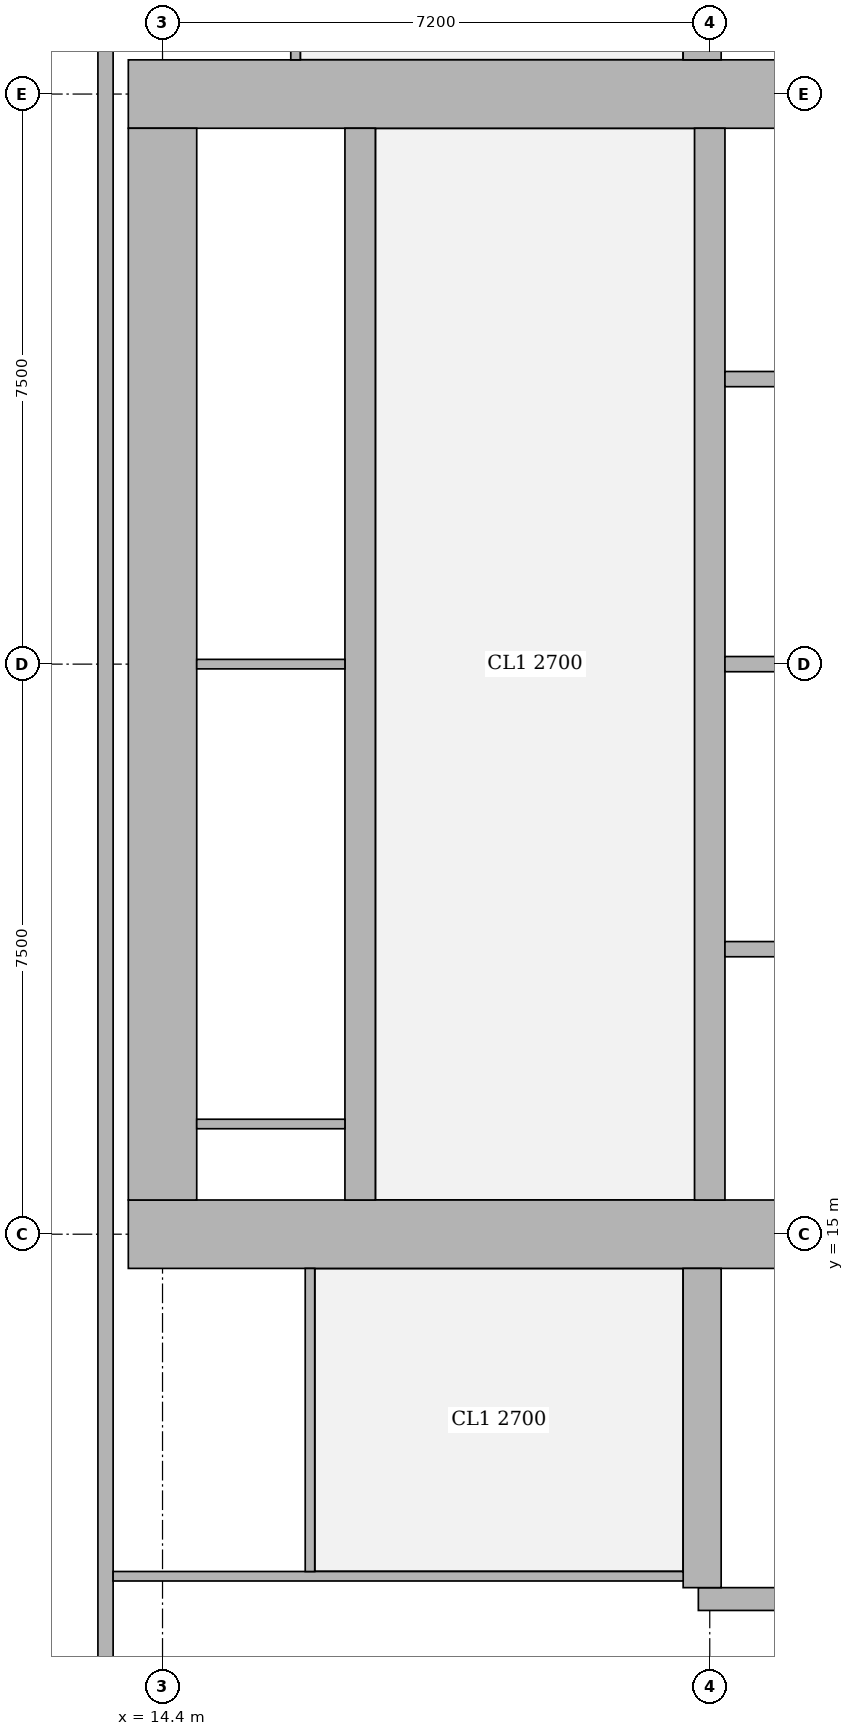
"""IFC4 building model, lengths in metres.
Left out: names, types, materials, properties, quantities, classifications, styles, units other than length and angle.
Written with IfcOpenShell. Run it as: python <this file> out.ifc"""

import sys

from ifc_helpers import new_model, si_unit, direction, frame, frame_2d, origin, place, context, subcontext, project, spatial, rectangle, extrude, element, fill, save


model = new_model("IFC4")
c1 = context("Model", 3, precision=1e-05, world=origin(), true_north=direction((0.0, 1.0)))
c2 = subcontext(c1, "Body", "Model", "MODEL_VIEW")
j1 = project(units=[si_unit("LENGTHUNIT", "METRE"), si_unit("PLANEANGLEUNIT", "RADIAN")], contexts=[c1])
p1 = place(None, origin())
s1 = spatial("IfcSite", under=j1, at=p1, CompositionType="ELEMENT")
p2 = place(p1, origin())
s2 = spatial("IfcBuilding", under=s1, at=p2, CompositionType="ELEMENT")
p3 = place(p2, frame((0.0, 0.0, 274.1)))
s3 = spatial("IfcBuildingStorey", under=s2, at=p3, CompositionType="ELEMENT", Elevation=274.1)
p4 = place(p3, frame((13.95, 15.0, 0.0), z_axis=(0.0, 0.0, 1.0), x_axis=(1.0, 0.0, 0.0)))
e1 = element("IfcWall", 1, at=p4, inside=s3, PredefinedType="SHEAR", context=c2, shape_type="SweptSolid", body=[
    extrude(rectangle(XDim=15.3, YDim=0.9, at=frame_2d((7.65, 0.0))), origin(), (0.0, 0.0, 1.0), 3.75),
])
p5 = place(p4, frame((4.45, 0.0, 0.0)))
e2 = element("IfcOpeningElement", 2, at=p5, cuts=e1, PredefinedType="OPENING", context=c2, shape_type="SweptSolid", body=[
    extrude(rectangle(XDim=1.8, YDim=2.1, at=frame_2d((0.9, 1.05))), frame((0.0, 0.46, 0.0), z_axis=(0.0, -1.0, 0.0), x_axis=(1.0, 0.0, 0.0)), (0.0, 0.0, 1.0), 0.92),
])
p6 = place(p4, frame((10.7, 0.0, 0.0)))
e3 = element("IfcOpeningElement", 3, at=p6, cuts=e1, PredefinedType="OPENING", context=c2, shape_type="SweptSolid", body=[
    extrude(rectangle(XDim=1.1, YDim=2.1, at=frame_2d((0.55, 1.05))), frame((0.0, 0.46, 0.0), z_axis=(0.0, -1.0, 0.0), x_axis=(1.0, 0.0, 0.0)), (0.0, 0.0, 1.0), 0.92),
])
p7 = place(p3, frame((13.95, 30.0, 0.0), z_axis=(0.0, 0.0, 1.0), x_axis=(1.0, 0.0, 0.0)))
e4 = element("IfcWall", 4, at=p7, inside=s3, PredefinedType="SHEAR", context=c2, shape_type="SweptSolid", body=[
    extrude(rectangle(XDim=15.3, YDim=0.9, at=frame_2d((7.65, 0.0))), origin(), (0.0, 0.0, 1.0), 3.75),
])
p8 = place(p7, frame((4.45, 0.0, 0.0)))
e5 = element("IfcOpeningElement", 5, at=p8, cuts=e4, PredefinedType="OPENING", context=c2, shape_type="SweptSolid", body=[
    extrude(rectangle(XDim=1.8, YDim=2.1, at=frame_2d((0.9, 1.05))), frame((0.0, 0.46, 0.0), z_axis=(0.0, -1.0, 0.0), x_axis=(1.0, 0.0, 0.0)), (0.0, 0.0, 1.0), 0.92),
])
p9 = place(p7, frame((10.7, 0.0, 0.0)))
e6 = element("IfcOpeningElement", 6, at=p9, cuts=e4, PredefinedType="OPENING", context=c2, shape_type="SweptSolid", body=[
    extrude(rectangle(XDim=1.1, YDim=2.1, at=frame_2d((0.55, 1.05))), frame((0.0, 0.46, 0.0), z_axis=(0.0, -1.0, 0.0), x_axis=(1.0, 0.0, 0.0)), (0.0, 0.0, 1.0), 0.92),
])
p10 = place(p3, frame((14.4, 15.45, 0.0), z_axis=(0.0, 0.0, 1.0), x_axis=(0.0, 1.0, 0.0)))
e7 = element("IfcWall", 7, at=p10, inside=s3, PredefinedType="SHEAR", context=c2, shape_type="SweptSolid", body=[
    extrude(rectangle(XDim=14.1, YDim=0.9, at=frame_2d((7.05, 0.0))), origin(), (0.0, 0.0, 1.0), 3.75),
])
p11 = place(p3, frame((17.0, 15.45, 0.0), z_axis=(0.0, 0.0, 1.0), x_axis=(0.0, 1.0, 0.0)))
e8 = element("IfcWall", 8, at=p11, inside=s3, PredefinedType="SHEAR", context=c2, shape_type="SweptSolid", body=[
    extrude(rectangle(XDim=14.1, YDim=0.4, at=frame_2d((7.05, 0.0))), origin(), (0.0, 0.0, 1.0), 3.75),
])
p12 = place(p11, frame((1.05, 0.0, 0.0)))
e9 = element("IfcOpeningElement", 9, at=p12, cuts=e8, PredefinedType="OPENING", context=c2, shape_type="SweptSolid", body=[
    extrude(rectangle(XDim=1.0, YDim=2.1, at=frame_2d((0.5, 1.05))), frame((0.0, 0.21, 0.0), z_axis=(0.0, -1.0, 0.0), x_axis=(1.0, 0.0, 0.0)), (0.0, 0.0, 1.0), 0.42),
])
p13 = place(p11, frame((4.675, 0.0, 0.0)))
e10 = element("IfcOpeningElement", 10, at=p13, cuts=e8, PredefinedType="OPENING", context=c2, shape_type="SweptSolid", body=[
    extrude(rectangle(XDim=1.0, YDim=2.1, at=frame_2d((0.5, 1.05))), frame((0.0, 0.21, 0.0), z_axis=(0.0, -1.0, 0.0), x_axis=(1.0, 0.0, 0.0)), (0.0, 0.0, 1.0), 0.42),
])
p14 = place(p11, frame((8.425, 0.0, 0.0)))
e11 = element("IfcOpeningElement", 11, at=p14, cuts=e8, PredefinedType="OPENING", context=c2, shape_type="SweptSolid", body=[
    extrude(rectangle(XDim=1.0, YDim=2.1, at=frame_2d((0.5, 1.05))), frame((0.0, 0.21, 0.0), z_axis=(0.0, -1.0, 0.0), x_axis=(1.0, 0.0, 0.0)), (0.0, 0.0, 1.0), 0.42),
])
p15 = place(p11, frame((12.175, 0.0, 0.0)))
e12 = element("IfcOpeningElement", 12, at=p15, cuts=e8, PredefinedType="OPENING", context=c2, shape_type="SweptSolid", body=[
    extrude(rectangle(XDim=1.0, YDim=2.1, at=frame_2d((0.5, 1.05))), frame((0.0, 0.21, 0.0), z_axis=(0.0, -1.0, 0.0), x_axis=(1.0, 0.0, 0.0)), (0.0, 0.0, 1.0), 0.42),
])
p16 = place(p3, frame((21.6, 15.45, 0.0), z_axis=(0.0, 0.0, 1.0), x_axis=(0.0, 1.0, 0.0)))
e13 = element("IfcWall", 13, at=p16, inside=s3, PredefinedType="SHEAR", context=c2, shape_type="SweptSolid", body=[
    extrude(rectangle(XDim=14.1, YDim=0.4, at=frame_2d((7.05, 0.0))), origin(), (0.0, 0.0, 1.0), 3.75),
])
p17 = place(p16, frame((0.875, 0.0, 0.0)))
e14 = element("IfcOpeningElement", 14, at=p17, cuts=e13, PredefinedType="OPENING", context=c2, shape_type="SweptSolid", body=[
    extrude(rectangle(XDim=1.1, YDim=2.1, at=frame_2d((0.55, 1.05))), frame((0.0, 0.21, 0.0), z_axis=(0.0, -1.0, 0.0), x_axis=(1.0, 0.0, 0.0)), (0.0, 0.0, 1.0), 0.42),
])
p18 = place(p16, frame((4.625, 0.0, 0.0)))
e15 = element("IfcOpeningElement", 15, at=p18, cuts=e13, PredefinedType="OPENING", context=c2, shape_type="SweptSolid", body=[
    extrude(rectangle(XDim=1.1, YDim=2.1, at=frame_2d((0.55, 1.05))), frame((0.0, 0.21, 0.0), z_axis=(0.0, -1.0, 0.0), x_axis=(1.0, 0.0, 0.0)), (0.0, 0.0, 1.0), 0.42),
])
p19 = place(p16, frame((8.375, 0.0, 0.0)))
e16 = element("IfcOpeningElement", 16, at=p19, cuts=e13, PredefinedType="OPENING", context=c2, shape_type="SweptSolid", body=[
    extrude(rectangle(XDim=1.1, YDim=2.1, at=frame_2d((0.55, 1.05))), frame((0.0, 0.21, 0.0), z_axis=(0.0, -1.0, 0.0), x_axis=(1.0, 0.0, 0.0)), (0.0, 0.0, 1.0), 0.42),
])
p20 = place(p16, frame((12.125, 0.0, 0.0)))
e17 = element("IfcOpeningElement", 17, at=p20, cuts=e13, PredefinedType="OPENING", context=c2, shape_type="SweptSolid", body=[
    extrude(rectangle(XDim=1.1, YDim=2.1, at=frame_2d((0.55, 1.05))), frame((0.0, 0.21, 0.0), z_axis=(0.0, -1.0, 0.0), x_axis=(1.0, 0.0, 0.0)), (0.0, 0.0, 1.0), 0.42),
])
p21 = place(p3, frame((21.45, 10.2, 0.0), z_axis=(0.0, 0.0, 1.0), x_axis=(1.0, 0.0, 0.0)))
e18 = element("IfcWall", 18, at=p21, inside=s3, PredefinedType="SHEAR", context=c2, shape_type="SweptSolid", body=[
    extrude(rectangle(XDim=7.5, YDim=0.3, at=frame_2d((3.75, 0.0))), origin(), (0.0, 0.0, 1.0), 3.75),
])
p22 = place(p21, frame((1.2, 0.0, 0.0)))
e19 = element("IfcOpeningElement", 19, at=p22, cuts=e18, PredefinedType="OPENING", context=c2, shape_type="SweptSolid", body=[
    extrude(rectangle(XDim=1.1, YDim=2.1, at=frame_2d((0.55, 1.05))), frame((0.0, 0.16, 0.0), z_axis=(0.0, -1.0, 0.0), x_axis=(1.0, 0.0, 0.0)), (0.0, 0.0, 1.0), 0.32),
])
for number, where, z_axis, x_axis in (
    (20, (21.5, 10.35, 0.0), (0.0, 0.0, 1.0), (0.0, 1.0, 0.0)),
    (21, (21.5, 30.45, 0.0), (0.0, 0.0, 1.0), (0.0, 1.0, 0.0)),
):
    element("IfcWall", number, at=place(p3, frame(where, z_axis=z_axis, x_axis=x_axis)), inside=s3, PredefinedType="SHEAR", context=c2, shape_type="SweptSolid", body=[
        extrude(rectangle(XDim=4.2, YDim=0.5, at=frame_2d((2.1, 0.0))), origin(), (0.0, 0.0, 1.0), 3.75),
    ])
p23 = place(p3, frame((13.65, 43.037, 0.0), z_axis=(0.0, 0.0, 1.0), x_axis=(0.0, -1.0, 0.0)))
e22 = element("IfcWall", 22, at=p23, inside=s3, PredefinedType="SOLIDWALL", context=c2, shape_type="SweptSolid", body=[
    extrude(rectangle(XDim=35.374, YDim=0.2, at=frame_2d((17.687, 0.0))), origin(), (0.0, 0.0, 1.0), 3.5),
])
p24 = place(p23, frame((1.959, 0.0, 0.9)))
e23 = element("IfcOpeningElement", 23, at=p24, cuts=e22, PredefinedType="OPENING", context=c2, shape_type="SweptSolid", body=[
    extrude(rectangle(XDim=1.8, YDim=1.5, at=frame_2d((0.9, 0.75))), frame((0.0, 0.11, 0.0), z_axis=(0.0, -1.0, 0.0), x_axis=(1.0, 0.0, 0.0)), (0.0, 0.0, 1.0), 0.22),
])
p25 = place(p3, frame((13.75, 10.5, 0.0), z_axis=(0.0, 0.0, 1.0), x_axis=(1.0, 0.0, 0.0)))
e24 = element("IfcWall", 24, at=p25, inside=s3, PredefinedType="PARTITIONING", context=c2, shape_type="SweptSolid", body=[
    extrude(rectangle(XDim=7.5, YDim=0.125, at=frame_2d((3.75, 0.0))), origin(), (0.0, 0.0, 1.0), 3.5),
])
p26 = place(p25, frame((4.245, 0.0, 0.0)))
e25 = element("IfcOpeningElement", 25, at=p26, cuts=e24, PredefinedType="OPENING", context=c2, shape_type="SweptSolid", body=[
    extrude(rectangle(XDim=1.8, YDim=2.1, at=frame_2d((0.9, 1.05))), frame((0.0, 0.073, 0.0), z_axis=(0.0, -1.0, 0.0), x_axis=(1.0, 0.0, 0.0)), (0.0, 0.0, 1.0), 0.145),
])
p27 = place(p3, frame((16.34, 10.562, 0.0), z_axis=(0.0, 0.0, 1.0), x_axis=(0.0, 1.0, 0.0)))
e26 = element("IfcWall", 26, at=p27, inside=s3, PredefinedType="PARTITIONING", context=c2, shape_type="SweptSolid", body=[
    extrude(rectangle(XDim=3.988, YDim=0.125, at=frame_2d((1.994, 0.0))), origin(), (0.0, 0.0, 1.0), 3.5),
])
p28 = place(p27, frame((1.438, 0.0, 0.0)))
e27 = element("IfcOpeningElement", 27, at=p28, cuts=e26, PredefinedType="OPENING", context=c2, shape_type="SweptSolid", body=[
    extrude(rectangle(XDim=1.0, YDim=2.1, at=frame_2d((0.5, 1.05))), frame((0.0, 0.073, 0.0), z_axis=(0.0, -1.0, 0.0), x_axis=(1.0, 0.0, 0.0)), (0.0, 0.0, 1.0), 0.145),
])
p29 = place(p3, frame((16.15, 30.45, 0.0), z_axis=(0.0, 0.0, 1.0), x_axis=(0.0, 1.0, 0.0)))
e28 = element("IfcWall", 28, at=p29, inside=s3, PredefinedType="PARTITIONING", context=c2, shape_type="SweptSolid", body=[
    extrude(rectangle(XDim=4.387, YDim=0.125, at=frame_2d((2.193, 0.0))), origin(), (0.0, 0.0, 1.0), 3.5),
])
p30 = place(p29, frame((1.75, 0.0, 0.0)))
e29 = element("IfcOpeningElement", 29, at=p30, cuts=e28, PredefinedType="OPENING", context=c2, shape_type="SweptSolid", body=[
    extrude(rectangle(XDim=1.0, YDim=2.1, at=frame_2d((0.5, 1.05))), frame((0.0, 0.073, 0.0), z_axis=(0.0, -1.0, 0.0), x_axis=(1.0, 0.0, 0.0)), (0.0, 0.0, 1.0), 0.145),
])
p31 = place(p3, frame((14.85, 16.45, 0.0), z_axis=(0.0, 0.0, 1.0), x_axis=(1.0, 0.0, 0.0)))
e30 = element("IfcWall", 30, at=p31, inside=s3, PredefinedType="PARTITIONING", context=c2, shape_type="SweptSolid", body=[
    extrude(rectangle(XDim=1.95, YDim=0.125, at=frame_2d((0.975, 0.0))), origin(), (0.0, 0.0, 1.0), 3.5),
])
p32 = place(p31, frame((0.2, 0.0, 0.0)))
e31 = element("IfcOpeningElement", 31, at=p32, cuts=e30, PredefinedType="OPENING", context=c2, shape_type="SweptSolid", body=[
    extrude(rectangle(XDim=1.0, YDim=2.1, at=frame_2d((0.5, 1.05))), frame((0.0, 0.073, 0.0), z_axis=(0.0, -1.0, 0.0), x_axis=(1.0, 0.0, 0.0)), (0.0, 0.0, 1.0), 0.145),
])
p33 = place(p3, frame((14.85, 22.5, 0.0), z_axis=(0.0, 0.0, 1.0), x_axis=(1.0, 0.0, 0.0)))
e32 = element("IfcWall", 32, at=p33, inside=s3, PredefinedType="PARTITIONING", context=c2, shape_type="SweptSolid", body=[
    extrude(rectangle(XDim=1.95, YDim=0.125, at=frame_2d((0.975, 0.0))), origin(), (0.0, 0.0, 1.0), 3.5),
])
for number, where, z_axis, x_axis in (
    (33, (21.8, 18.75, 0.0), (0.0, 0.0, 1.0), (1.0, 0.0, 0.0)),
    (34, (21.8, 22.5, 0.0), (0.0, 0.0, 1.0), (1.0, 0.0, 0.0)),
    (35, (21.8, 26.25, 0.0), (0.0, 0.0, 1.0), (1.0, 0.0, 0.0)),
):
    element("IfcWall", number, at=place(p3, frame(where, z_axis=z_axis, x_axis=x_axis)), inside=s3, PredefinedType="SOLIDWALL", context=c2, shape_type="SweptSolid", body=[
        extrude(rectangle(XDim=2.2, YDim=0.2, at=frame_2d((1.1, 0.0))), origin(), (0.0, 0.0, 1.0), 3.5),
    ])
p34 = place(p28, origin())
e36 = element("IfcDoor", 36, at=p34, inside=s3, OperationType="SINGLE_SWING_LEFT", PredefinedType="DOOR", context=c2, shape_type="SweptSolid", body=[
    extrude(rectangle(XDim=1.0, YDim=2.1, at=frame_2d((0.5, 1.05))), frame((0.0, 0.025, 0.0), z_axis=(0.0, -1.0, 0.0), x_axis=(1.0, 0.0, 0.0)), (0.0, 0.0, 1.0), 0.05),
])
fill(e27, e36)
p35 = place(p26, origin())
e37 = element("IfcDoor", 37, at=p35, inside=s3, OperationType="DOUBLE_DOOR_SINGLE_SWING", PredefinedType="DOOR", context=c2, shape_type="SweptSolid", body=[
    extrude(rectangle(XDim=1.8, YDim=2.1, at=frame_2d((0.9, 1.05))), frame((0.0, 0.025, 0.0), z_axis=(0.0, -1.0, 0.0), x_axis=(1.0, 0.0, 0.0)), (0.0, 0.0, 1.0), 0.05),
])
fill(e25, e37)
p36 = place(p32, origin())
e38 = element("IfcDoor", 38, at=p36, inside=s3, OperationType="SINGLE_SWING_RIGHT", PredefinedType="DOOR", context=c2, shape_type="SweptSolid", body=[
    extrude(rectangle(XDim=1.0, YDim=2.1, at=frame_2d((0.5, 1.05))), frame((0.0, 0.025, 0.0), z_axis=(0.0, -1.0, 0.0), x_axis=(1.0, 0.0, 0.0)), (0.0, 0.0, 1.0), 0.05),
])
fill(e31, e38)
p37 = place(p12, origin())
e39 = element("IfcDoor", 39, at=p37, inside=s3, OperationType="SINGLE_SWING_LEFT", PredefinedType="DOOR", context=c2, shape_type="SweptSolid", body=[
    extrude(rectangle(XDim=1.0, YDim=2.1, at=frame_2d((0.5, 1.05))), frame((0.0, 0.025, 0.0), z_axis=(0.0, -1.0, 0.0), x_axis=(1.0, 0.0, 0.0)), (0.0, 0.0, 1.0), 0.05),
])
fill(e9, e39)
p38 = place(p13, origin())
e40 = element("IfcDoor", 40, at=p38, inside=s3, OperationType="SINGLE_SWING_RIGHT", PredefinedType="DOOR", context=c2, shape_type="SweptSolid", body=[
    extrude(rectangle(XDim=1.0, YDim=2.1, at=frame_2d((0.5, 1.05))), frame((0.0, 0.025, 0.0), z_axis=(0.0, -1.0, 0.0), x_axis=(1.0, 0.0, 0.0)), (0.0, 0.0, 1.0), 0.05),
])
fill(e10, e40)
p39 = place(p14, origin())
e41 = element("IfcDoor", 41, at=p39, inside=s3, OperationType="SINGLE_SWING_LEFT", PredefinedType="DOOR", context=c2, shape_type="SweptSolid", body=[
    extrude(rectangle(XDim=1.0, YDim=2.1, at=frame_2d((0.5, 1.05))), frame((0.0, 0.025, 0.0), z_axis=(0.0, -1.0, 0.0), x_axis=(1.0, 0.0, 0.0)), (0.0, 0.0, 1.0), 0.05),
])
fill(e11, e41)
p40 = place(p15, origin())
e42 = element("IfcDoor", 42, at=p40, inside=s3, OperationType="SINGLE_SWING_RIGHT", PredefinedType="DOOR", context=c2, shape_type="SweptSolid", body=[
    extrude(rectangle(XDim=1.0, YDim=2.1, at=frame_2d((0.5, 1.05))), frame((0.0, 0.025, 0.0), z_axis=(0.0, -1.0, 0.0), x_axis=(1.0, 0.0, 0.0)), (0.0, 0.0, 1.0), 0.05),
])
fill(e12, e42)
p41 = place(p5, origin())
e43 = element("IfcDoor", 43, at=p41, inside=s3, OperationType="DOUBLE_DOOR_SINGLE_SWING", PredefinedType="DOOR", context=c2, shape_type="SweptSolid", body=[
    extrude(rectangle(XDim=1.8, YDim=2.1, at=frame_2d((0.9, 1.05))), frame((0.0, 0.025, 0.0), z_axis=(0.0, -1.0, 0.0), x_axis=(1.0, 0.0, 0.0)), (0.0, 0.0, 1.0), 0.05),
])
fill(e2, e43)
p42 = place(p8, origin())
e44 = element("IfcDoor", 44, at=p42, inside=s3, OperationType="DOUBLE_DOOR_SINGLE_SWING", PredefinedType="DOOR", context=c2, shape_type="SweptSolid", body=[
    extrude(rectangle(XDim=1.8, YDim=2.1, at=frame_2d((0.9, 1.05))), frame((0.0, 0.025, 0.0), z_axis=(0.0, -1.0, 0.0), x_axis=(1.0, 0.0, 0.0)), (0.0, 0.0, 1.0), 0.05),
])
fill(e5, e44)
p43 = place(p17, origin())
e45 = element("IfcDoor", 45, at=p43, inside=s3, OperationType="DOUBLE_DOOR_SLIDING", PredefinedType="DOOR", context=c2, shape_type="SweptSolid", body=[
    extrude(rectangle(XDim=1.1, YDim=2.1, at=frame_2d((0.55, 1.05))), frame((0.0, 0.025, 0.0), z_axis=(0.0, -1.0, 0.0), x_axis=(1.0, 0.0, 0.0)), (0.0, 0.0, 1.0), 0.05),
])
fill(e14, e45)
p44 = place(p18, origin())
e46 = element("IfcDoor", 46, at=p44, inside=s3, OperationType="DOUBLE_DOOR_SLIDING", PredefinedType="DOOR", context=c2, shape_type="SweptSolid", body=[
    extrude(rectangle(XDim=1.1, YDim=2.1, at=frame_2d((0.55, 1.05))), frame((0.0, 0.025, 0.0), z_axis=(0.0, -1.0, 0.0), x_axis=(1.0, 0.0, 0.0)), (0.0, 0.0, 1.0), 0.05),
])
fill(e15, e46)
p45 = place(p19, origin())
e47 = element("IfcDoor", 47, at=p45, inside=s3, OperationType="DOUBLE_DOOR_SLIDING", PredefinedType="DOOR", context=c2, shape_type="SweptSolid", body=[
    extrude(rectangle(XDim=1.1, YDim=2.1, at=frame_2d((0.55, 1.05))), frame((0.0, 0.025, 0.0), z_axis=(0.0, -1.0, 0.0), x_axis=(1.0, 0.0, 0.0)), (0.0, 0.0, 1.0), 0.05),
])
fill(e16, e47)
p46 = place(p20, origin())
e48 = element("IfcDoor", 48, at=p46, inside=s3, OperationType="DOUBLE_DOOR_SLIDING", PredefinedType="DOOR", context=c2, shape_type="SweptSolid", body=[
    extrude(rectangle(XDim=1.1, YDim=2.1, at=frame_2d((0.55, 1.05))), frame((0.0, 0.025, 0.0), z_axis=(0.0, -1.0, 0.0), x_axis=(1.0, 0.0, 0.0)), (0.0, 0.0, 1.0), 0.05),
])
fill(e17, e48)
save(model, sys.argv[1])
